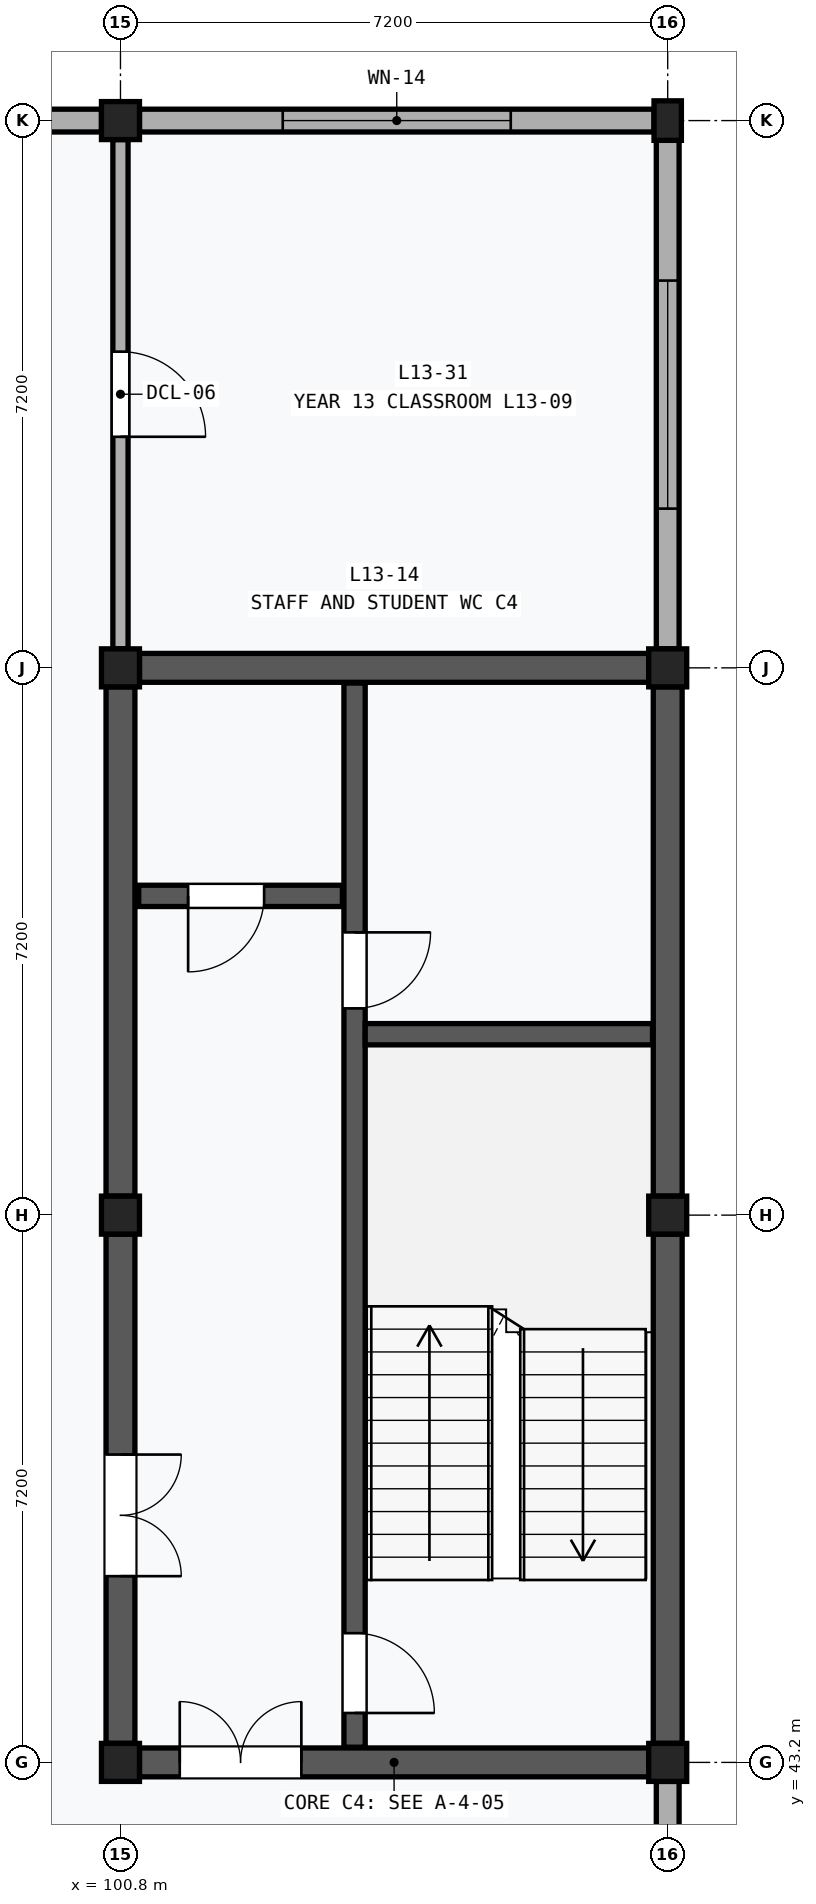
"""IFC4 building model, lengths in metres.
Left out: names, types, materials, properties, quantities, classifications, styles, units other than length and angle.
Written with IfcOpenShell. Run it as: python <this file> out.ifc"""

import sys

from ifc_helpers import new_model, si_unit, direction, frame, frame_2d, origin, origin_2d, place, context, subcontext, project, spatial, rectangle, extrude, element, fill, save


model = new_model("IFC4")
c1 = context("Model", 3, precision=1e-05, world=origin(), true_north=direction((0.0, 1.0)))
c2 = subcontext(c1, "Body", "Model", "MODEL_VIEW")
j1 = project(units=[si_unit("LENGTHUNIT", "METRE"), si_unit("PLANEANGLEUNIT", "RADIAN")], contexts=[c1])
p1 = place(None, origin())
s1 = spatial("IfcSite", under=j1, at=p1, CompositionType="ELEMENT")
p2 = place(p1, origin())
s2 = spatial("IfcBuilding", under=s1, at=p2, CompositionType="ELEMENT")
p3 = place(p2, frame((0.0, 0.0, 55.0)))
s3 = spatial("IfcBuildingStorey", under=s2, at=p3, CompositionType="ELEMENT", Elevation=55.0)
for number, where, z_axis, x_axis in (
    (1, (100.8, 43.2, 0.0), (0.0, 0.0, 1.0), (1.0, 0.0, 0.0)),
    (2, (100.8, 50.4, 0.0), (0.0, 0.0, 1.0), (1.0, 0.0, 0.0)),
    (3, (100.8, 57.6, 0.0), (0.0, 0.0, 1.0), (1.0, 0.0, 0.0)),
    (4, (100.8, 64.8, 0.0), (0.0, 0.0, 1.0), (1.0, 0.0, 0.0)),
    (5, (108.0, 43.2, 0.0), (0.0, 0.0, 1.0), (1.0, 0.0, 0.0)),
    (6, (108.0, 50.4, 0.0), (0.0, 0.0, 1.0), (1.0, 0.0, 0.0)),
    (7, (108.0, 57.6, 0.0), (0.0, 0.0, 1.0), (1.0, 0.0, 0.0)),
):
    element("IfcColumn", number, at=place(p3, frame(where, z_axis=z_axis, x_axis=x_axis)), inside=s3, PredefinedType="COLUMN", context=c2, shape_type="SweptSolid", body=[
        extrude(rectangle(XDim=0.5, YDim=0.5, at=origin_2d()), origin(), (0.0, 0.0, 1.0), 4.0),
    ])
p4 = place(p3, frame((108.0, 64.8, 0.0), z_axis=(0.0, 0.0, 1.0), x_axis=(1.0, 0.0, 0.0)))
e8 = element("IfcColumn", 8, at=p4, inside=s3, PredefinedType="PILASTER", context=c2, shape_type="SweptSolid", body=[
    extrude(rectangle(XDim=0.36, YDim=0.52, at=origin_2d()), origin(), (0.0, 0.0, 1.0), 4.0),
])
p5 = place(p3, frame((93.85, 64.8, 0.0), z_axis=(0.0, 0.0, 1.0), x_axis=(1.0, 0.0, 0.0)))
e9 = element("IfcWall", 9, at=p5, inside=s3, PredefinedType="SOLIDWALL", context=c2, shape_type="SweptSolid", body=[
    extrude(rectangle(XDim=6.7, YDim=0.3, at=frame_2d((3.35, 0.0))), origin(), (0.0, 0.0, 1.0), 3.17),
])
p6 = place(p5, frame((2.0, 0.0, 0.85)))
e10 = element("IfcOpeningElement", 10, at=p6, cuts=e9, PredefinedType="OPENING", context=c2, shape_type="SweptSolid", body=[
    extrude(rectangle(XDim=2.7, YDim=2.0, at=frame_2d((1.35, 1.0))), frame((0.0, 0.162, 0.0), z_axis=(0.0, -1.0, 0.0), x_axis=(1.0, 0.0, 0.0)), (0.0, 0.0, 1.0), 0.324),
])
p7 = place(p3, frame((108.0, 36.26, 0.0), z_axis=(0.0, 0.0, 1.0), x_axis=(0.0, 1.0, 0.0)))
e11 = element("IfcWall", 11, at=p7, inside=s3, PredefinedType="SOLIDWALL", context=c2, shape_type="SweptSolid", body=[
    extrude(rectangle(XDim=6.69, YDim=0.3, at=frame_2d((3.345, 0.0))), origin(), (0.0, 0.0, 1.0), 3.17),
])
p8 = place(p3, frame((101.05, 64.8, 0.0), z_axis=(0.0, 0.0, 1.0), x_axis=(1.0, 0.0, 0.0)))
e12 = element("IfcWall", 12, at=p8, inside=s3, PredefinedType="SOLIDWALL", context=c2, shape_type="SweptSolid", body=[
    extrude(rectangle(XDim=6.77, YDim=0.3, at=frame_2d((3.385, 0.0))), origin(), (0.0, 0.0, 1.0), 3.17),
])
p9 = place(p8, frame((1.885, 0.0, 0.85)))
e13 = element("IfcOpeningElement", 13, at=p9, cuts=e12, PredefinedType="OPENING", context=c2, shape_type="SweptSolid", body=[
    extrude(rectangle(XDim=3.0, YDim=2.0, at=frame_2d((1.5, 1.0))), frame((0.0, 0.162, 0.0), z_axis=(0.0, -1.0, 0.0), x_axis=(1.0, 0.0, 0.0)), (0.0, 0.0, 1.0), 0.324),
])
p10 = place(p3, frame((108.0, 57.85, 0.0), z_axis=(0.0, 0.0, 1.0), x_axis=(0.0, 1.0, 0.0)))
e14 = element("IfcWall", 14, at=p10, inside=s3, PredefinedType="SOLIDWALL", context=c2, shape_type="SweptSolid", body=[
    extrude(rectangle(XDim=6.69, YDim=0.3, at=frame_2d((3.345, 0.0))), origin(), (0.0, 0.0, 1.0), 3.17),
])
p11 = place(p10, frame((1.845, 0.0, 0.85)))
e15 = element("IfcOpeningElement", 15, at=p11, cuts=e14, PredefinedType="OPENING", context=c2, shape_type="SweptSolid", body=[
    extrude(rectangle(XDim=3.0, YDim=2.0, at=frame_2d((1.5, 1.0))), frame((0.0, 0.162, 0.0), z_axis=(0.0, -1.0, 0.0), x_axis=(1.0, 0.0, 0.0)), (0.0, 0.0, 1.0), 0.324),
])
p12 = place(p3, frame((100.8, 43.45, 0.0), z_axis=(0.0, 0.0, 1.0), x_axis=(0.0, 1.0, 0.0)))
e16 = element("IfcWall", 16, at=p12, inside=s3, PredefinedType="SHEAR", context=c2, shape_type="SweptSolid", body=[
    extrude(rectangle(XDim=6.7, YDim=0.38, at=frame_2d((3.35, 0.0))), origin(), (0.0, 0.0, 1.0), 3.09),
])
p13 = place(p12, frame((2.2, 0.0, 0.0)))
e17 = element("IfcOpeningElement", 17, at=p13, cuts=e16, PredefinedType="OPENING", context=c2, shape_type="SweptSolid", body=[
    extrude(rectangle(XDim=1.6, YDim=2.2, at=frame_2d((0.8, 1.1))), frame((0.0, 0.202, 0.0), z_axis=(0.0, -1.0, 0.0), x_axis=(1.0, 0.0, 0.0)), (0.0, 0.0, 1.0), 0.404),
])
p14 = place(p3, frame((100.8, 50.65, 0.0), z_axis=(0.0, 0.0, 1.0), x_axis=(0.0, 1.0, 0.0)))
e18 = element("IfcWall", 18, at=p14, inside=s3, PredefinedType="SHEAR", context=c2, shape_type="SweptSolid", body=[
    extrude(rectangle(XDim=6.7, YDim=0.38, at=frame_2d((3.35, 0.0))), origin(), (0.0, 0.0, 1.0), 3.09),
])
p15 = place(p3, frame((108.0, 43.45, 0.0), z_axis=(0.0, 0.0, 1.0), x_axis=(0.0, 1.0, 0.0)))
e19 = element("IfcWall", 19, at=p15, inside=s3, PredefinedType="SHEAR", context=c2, shape_type="SweptSolid", body=[
    extrude(rectangle(XDim=6.7, YDim=0.38, at=frame_2d((3.35, 0.0))), origin(), (0.0, 0.0, 1.0), 3.17),
])
p16 = place(p3, frame((108.0, 50.65, 0.0), z_axis=(0.0, 0.0, 1.0), x_axis=(0.0, 1.0, 0.0)))
e20 = element("IfcWall", 20, at=p16, inside=s3, PredefinedType="SHEAR", context=c2, shape_type="SweptSolid", body=[
    extrude(rectangle(XDim=6.7, YDim=0.38, at=frame_2d((3.35, 0.0))), origin(), (0.0, 0.0, 1.0), 3.17),
])
p17 = place(p3, frame((101.05, 43.2, 0.0), z_axis=(0.0, 0.0, 1.0), x_axis=(1.0, 0.0, 0.0)))
e21 = element("IfcWall", 21, at=p17, inside=s3, PredefinedType="SHEAR", context=c2, shape_type="SweptSolid", body=[
    extrude(rectangle(XDim=6.7, YDim=0.38, at=frame_2d((3.35, 0.0))), origin(), (0.0, 0.0, 1.0), 3.09),
])
p18 = place(p17, frame((0.53, 0.0, 0.0)))
e22 = element("IfcOpeningElement", 22, at=p18, cuts=e21, PredefinedType="OPENING", context=c2, shape_type="SweptSolid", body=[
    extrude(rectangle(XDim=1.6, YDim=2.2, at=frame_2d((0.8, 1.1))), frame((0.0, 0.202, 0.0), z_axis=(0.0, -1.0, 0.0), x_axis=(1.0, 0.0, 0.0)), (0.0, 0.0, 1.0), 0.404),
])
p19 = place(p3, frame((101.05, 57.6, 0.0), z_axis=(0.0, 0.0, 1.0), x_axis=(1.0, 0.0, 0.0)))
e23 = element("IfcWall", 23, at=p19, inside=s3, PredefinedType="SHEAR", context=c2, shape_type="SweptSolid", body=[
    extrude(rectangle(XDim=6.7, YDim=0.38, at=frame_2d((3.35, 0.0))), origin(), (0.0, 0.0, 1.0), 3.09),
])
p20 = place(p3, frame((103.88, 43.4, 0.0), z_axis=(0.0, 0.0, 1.0), x_axis=(0.0, 1.0, 0.0)))
e24 = element("IfcWall", 24, at=p20, inside=s3, PredefinedType="SHEAR", context=c2, shape_type="SweptSolid", body=[
    extrude(rectangle(XDim=14.0, YDim=0.28, at=frame_2d((7.0, 0.0))), origin(), (0.0, 0.0, 1.0), 3.77),
])
p21 = place(p20, frame((0.45, 0.0, 0.0)))
e25 = element("IfcOpeningElement", 25, at=p21, cuts=e24, PredefinedType="OPENING", context=c2, shape_type="SweptSolid", body=[
    extrude(rectangle(XDim=1.05, YDim=2.15, at=frame_2d((0.525, 1.075))), frame((0.0, 0.152, 0.0), z_axis=(0.0, -1.0, 0.0), x_axis=(1.0, 0.0, 0.0)), (0.0, 0.0, 1.0), 0.304),
])
p22 = place(p20, frame((9.72, 0.0, 0.0)))
e26 = element("IfcOpeningElement", 26, at=p22, cuts=e24, PredefinedType="OPENING", context=c2, shape_type="SweptSolid", body=[
    extrude(rectangle(XDim=1.0, YDim=2.15, at=frame_2d((0.5, 1.075))), frame((0.0, 0.152, 0.0), z_axis=(0.0, -1.0, 0.0), x_axis=(1.0, 0.0, 0.0)), (0.0, 0.0, 1.0), 0.304),
])
p23 = place(p3, frame((104.02, 52.78, 0.0), z_axis=(0.0, 0.0, 1.0), x_axis=(1.0, 0.0, 0.0)))
e27 = element("IfcWall", 27, at=p23, inside=s3, PredefinedType="SHEAR", context=c2, shape_type="SweptSolid", body=[
    extrude(rectangle(XDim=3.78, YDim=0.28, at=frame_2d((1.89, 0.0))), origin(), (0.0, 0.0, 1.0), 3.77),
])
p24 = place(p3, frame((101.04, 54.6, 0.0), z_axis=(0.0, 0.0, 1.0), x_axis=(1.0, 0.0, 0.0)))
e28 = element("IfcWall", 28, at=p24, inside=s3, PredefinedType="SHEAR", context=c2, shape_type="SweptSolid", body=[
    extrude(rectangle(XDim=2.68, YDim=0.28, at=frame_2d((1.34, 0.0))), origin(), (0.0, 0.0, 1.0), 3.77),
])
p25 = place(p24, frame((0.65, 0.0, 0.0)))
e29 = element("IfcOpeningElement", 29, at=p25, cuts=e28, PredefinedType="OPENING", context=c2, shape_type="SweptSolid", body=[
    extrude(rectangle(XDim=1.0, YDim=2.15, at=frame_2d((0.5, 1.075))), frame((0.0, 0.152, 0.0), z_axis=(0.0, -1.0, 0.0), x_axis=(1.0, 0.0, 0.0)), (0.0, 0.0, 1.0), 0.304),
])
p26 = place(p3, frame((100.8, 57.85, 0.0), z_axis=(0.0, 0.0, 1.0), x_axis=(0.0, 1.0, 0.0)))
e30 = element("IfcWall", 30, at=p26, inside=s3, PredefinedType="PARTITIONING", context=c2, shape_type="SweptSolid", body=[
    extrude(rectangle(XDim=6.7, YDim=0.2, at=frame_2d((3.35, 0.0))), origin(), (0.0, 0.0, 1.0), 3.09),
])
p27 = place(p26, frame((2.79, 0.0, 0.0)))
e31 = element("IfcOpeningElement", 31, at=p27, cuts=e30, PredefinedType="OPENING", context=c2, shape_type="SweptSolid", body=[
    extrude(rectangle(XDim=1.12, YDim=2.2, at=frame_2d((0.56, 1.1))), frame((0.0, 0.112, 0.0), z_axis=(0.0, -1.0, 0.0), x_axis=(1.0, 0.0, 0.0)), (0.0, 0.0, 1.0), 0.224),
])
p28 = place(p9, origin())
e32 = element("IfcWindow", 32, at=p28, inside=s3, PartitioningType="SINGLE_PANEL", PredefinedType="WINDOW", context=c2, shape_type="SweptSolid", body=[
    extrude(rectangle(XDim=3.0, YDim=2.0, at=frame_2d((1.5, 1.0))), frame((0.0, 0.03, 0.0), z_axis=(0.0, -1.0, 0.0), x_axis=(1.0, 0.0, 0.0)), (0.0, 0.0, 1.0), 0.06),
])
fill(e13, e32)
p29 = place(p11, origin())
e33 = element("IfcWindow", 33, at=p29, inside=s3, PartitioningType="SINGLE_PANEL", PredefinedType="WINDOW", context=c2, shape_type="SweptSolid", body=[
    extrude(rectangle(XDim=3.0, YDim=2.0, at=frame_2d((1.5, 1.0))), frame((0.0, 0.03, 0.0), z_axis=(0.0, -1.0, 0.0), x_axis=(1.0, 0.0, 0.0)), (0.0, 0.0, 1.0), 0.06),
])
fill(e15, e33)
p30 = place(p13, frame((1.6, 0.0, 0.0), z_axis=(0.0, 0.0, 1.0), x_axis=(-1.0, 0.0, 0.0)))
e34 = element("IfcDoor", 34, at=p30, inside=s3, OperationType="DOUBLE_DOOR_SINGLE_SWING", PredefinedType="DOOR", context=c2, shape_type="SweptSolid", body=[
    extrude(rectangle(XDim=1.6, YDim=2.2, at=frame_2d((0.8, 1.1))), frame((0.0, 0.025, 0.0), z_axis=(0.0, -1.0, 0.0), x_axis=(1.0, 0.0, 0.0)), (0.0, 0.0, 1.0), 0.05),
])
fill(e17, e34)
p31 = place(p18, origin())
e35 = element("IfcDoor", 35, at=p31, inside=s3, OperationType="DOUBLE_DOOR_SINGLE_SWING", PredefinedType="DOOR", context=c2, shape_type="SweptSolid", body=[
    extrude(rectangle(XDim=1.6, YDim=2.2, at=frame_2d((0.8, 1.1))), frame((0.0, 0.025, 0.0), z_axis=(0.0, -1.0, 0.0), x_axis=(1.0, 0.0, 0.0)), (0.0, 0.0, 1.0), 0.05),
])
fill(e22, e35)
p32 = place(p21, frame((1.05, 0.0, 0.0), z_axis=(0.0, 0.0, 1.0), x_axis=(-1.0, 0.0, 0.0)))
e36 = element("IfcDoor", 36, at=p32, inside=s3, OperationType="SINGLE_SWING_RIGHT", PredefinedType="DOOR", context=c2, shape_type="SweptSolid", body=[
    extrude(rectangle(XDim=1.05, YDim=2.15, at=frame_2d((0.525, 1.075))), frame((0.0, 0.025, 0.0), z_axis=(0.0, -1.0, 0.0), x_axis=(1.0, 0.0, 0.0)), (0.0, 0.0, 1.0), 0.05),
])
fill(e25, e36)
p33 = place(p22, frame((1.0, 0.0, 0.0), z_axis=(0.0, 0.0, 1.0), x_axis=(-1.0, 0.0, 0.0)))
e37 = element("IfcDoor", 37, at=p33, inside=s3, OperationType="SINGLE_SWING_LEFT", PredefinedType="DOOR", context=c2, shape_type="SweptSolid", body=[
    extrude(rectangle(XDim=1.0, YDim=2.15, at=frame_2d((0.5, 1.075))), frame((0.0, 0.025, 0.0), z_axis=(0.0, -1.0, 0.0), x_axis=(1.0, 0.0, 0.0)), (0.0, 0.0, 1.0), 0.05),
])
fill(e26, e37)
p34 = place(p25, frame((1.0, 0.0, 0.0), z_axis=(0.0, 0.0, 1.0), x_axis=(-1.0, 0.0, 0.0)))
e38 = element("IfcDoor", 38, at=p34, inside=s3, OperationType="SINGLE_SWING_RIGHT", PredefinedType="DOOR", context=c2, shape_type="SweptSolid", body=[
    extrude(rectangle(XDim=1.0, YDim=2.15, at=frame_2d((0.5, 1.075))), frame((0.0, 0.025, 0.0), z_axis=(0.0, -1.0, 0.0), x_axis=(1.0, 0.0, 0.0)), (0.0, 0.0, 1.0), 0.05),
])
fill(e29, e38)
p35 = place(p27, frame((1.12, 0.0, 0.0), z_axis=(0.0, 0.0, 1.0), x_axis=(-1.0, 0.0, 0.0)))
e39 = element("IfcDoor", 39, at=p35, inside=s3, OperationType="SINGLE_SWING_RIGHT", PredefinedType="DOOR", context=c2, shape_type="SweptSolid", body=[
    extrude(rectangle(XDim=1.12, YDim=2.2, at=frame_2d((0.56, 1.1))), frame((0.0, 0.025, 0.0), z_axis=(0.0, -1.0, 0.0), x_axis=(1.0, 0.0, 0.0)), (0.0, 0.0, 1.0), 0.05),
])
fill(e31, e39)
save(model, sys.argv[1])
